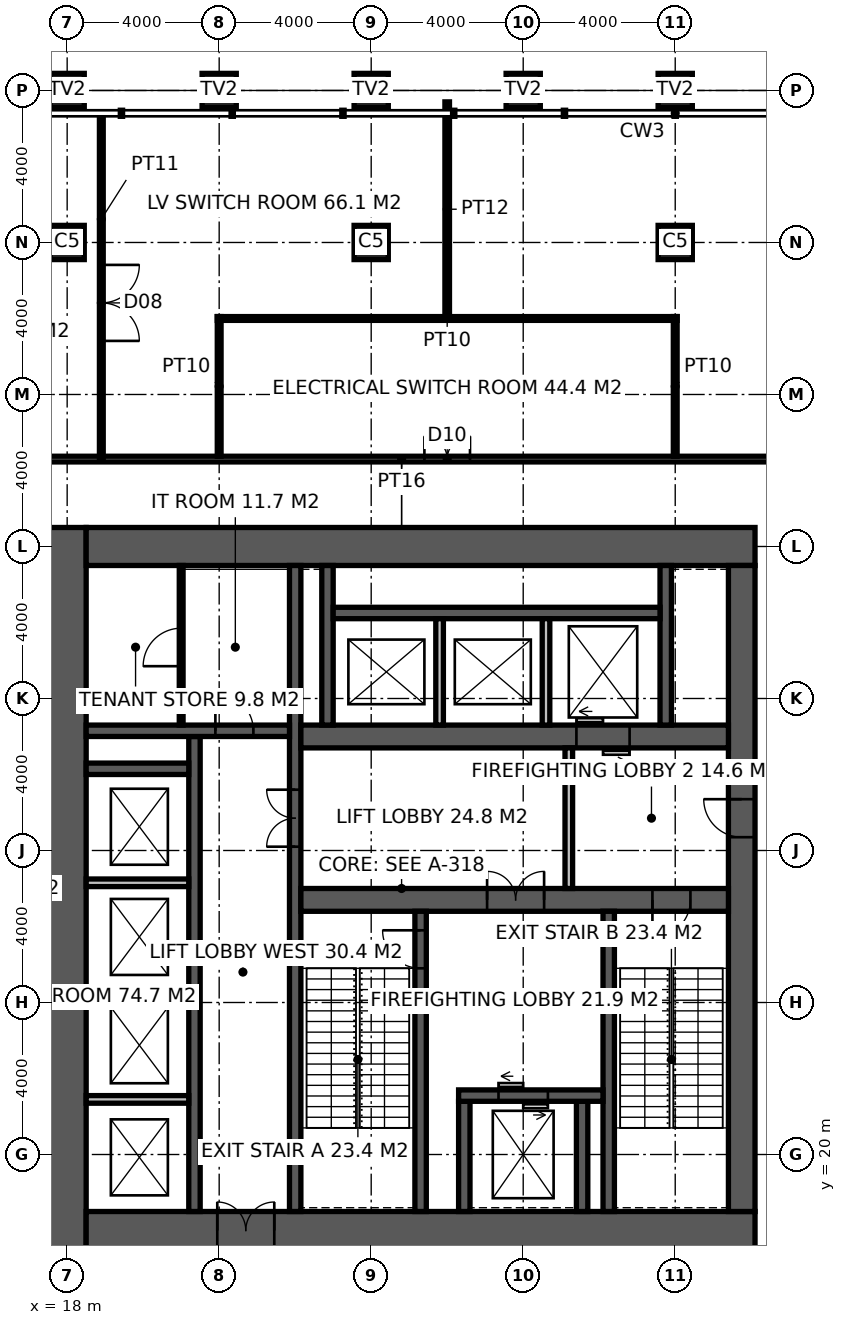
"""IFC4 building model, lengths in metres.
Left out: names, types, materials, properties, quantities, classifications, styles, units other than length and angle.
Written with IfcOpenShell. Run it as: python <this file> out.ifc"""

import sys

from ifc_helpers import new_model, si_unit, direction, frame, frame_2d, origin, origin_2d, place, context, subcontext, project, spatial, rectangle, hollow_rectangle, extrude, element, fill, save


model = new_model("IFC4")
c1 = context("Model", 3, precision=1e-05, world=origin(), true_north=direction((0.0, 1.0)))
c2 = subcontext(c1, "Body", "Model", "MODEL_VIEW")
j1 = project(units=[si_unit("LENGTHUNIT", "METRE"), si_unit("PLANEANGLEUNIT", "RADIAN")], contexts=[c1])
p1 = place(None, origin())
s1 = spatial("IfcSite", under=j1, at=p1, CompositionType="ELEMENT")
p2 = place(p1, origin())
s2 = spatial("IfcBuilding", under=s1, at=p2, CompositionType="ELEMENT")
p3 = place(p2, frame((0.0, 0.0, 71.0)))
s3 = spatial("IfcBuildingStorey", under=s2, at=p3, CompositionType="ELEMENT", Elevation=71.0)
for number, where, z_axis, x_axis in (
    (1, (18.0, 48.0, 0.0), (0.0, 0.0, 1.0), (1.0, 0.0, 0.0)),
    (2, (22.0, 48.0, 0.0), (0.0, 0.0, 1.0), (1.0, 0.0, 0.0)),
    (3, (26.0, 48.0, 0.0), (0.0, 0.0, 1.0), (1.0, 0.0, 0.0)),
    (4, (30.0, 48.0, 0.0), (0.0, 0.0, 1.0), (1.0, 0.0, 0.0)),
    (5, (34.0, 48.0, 0.0), (0.0, 0.0, 1.0), (1.0, 0.0, 0.0)),
):
    element("IfcColumn", number, at=place(p3, frame(where, z_axis=z_axis, x_axis=x_axis)), inside=s3, PredefinedType="USERDEFINED", context=c2, shape_type="SweptSolid", body=[
        extrude(hollow_rectangle(XDim=0.9, YDim=0.9, WallThickness=0.1, at=origin_2d()), origin(), (0.0, 0.0, 1.0), 5.4),
    ])
for number, where, z_axis, x_axis in (
    (6, (18.0, 44.0, 0.0), (0.0, 0.0, 1.0), (1.0, 0.0, 0.0)),
    (7, (26.0, 44.0, 0.0), (0.0, 0.0, 1.0), (1.0, 0.0, 0.0)),
    (8, (34.0, 44.0, 0.0), (0.0, 0.0, 1.0), (1.0, 0.0, 0.0)),
):
    element("IfcColumn", number, at=place(p3, frame(where, z_axis=z_axis, x_axis=x_axis)), inside=s3, PredefinedType="COLUMN", context=c2, shape_type="SweptSolid", body=[
        extrude(hollow_rectangle(XDim=0.9, YDim=0.9, WallThickness=0.1, at=origin_2d()), origin(), (0.0, 0.0, 1.0), 5.4),
    ])
p4 = place(p3, frame((18.0, 17.5, -0.15), z_axis=(0.0, 0.0, 1.0), x_axis=(0.0, 1.0, 0.0)))
e9 = element("IfcWall", 9, at=p4, inside=s3, PredefinedType="SHEAR", context=c2, shape_type="SweptSolid", body=[
    extrude(rectangle(XDim=19.0, YDim=1.0, at=frame_2d((9.5, 0.0))), origin(), (0.0, 0.0, 1.0), 5.4),
])
p5 = place(p3, frame((18.5, 18.0, -0.15), z_axis=(0.0, 0.0, 1.0), x_axis=(1.0, 0.0, 0.0)))
e10 = element("IfcWall", 10, at=p5, inside=s3, PredefinedType="SHEAR", context=c2, shape_type="SweptSolid", body=[
    extrude(rectangle(XDim=17.6, YDim=1.0, at=frame_2d((8.8, 0.0))), origin(), (0.0, 0.0, 1.0), 5.4),
])
p6 = place(p5, frame((3.45, 0.0, 0.15)))
e11 = element("IfcOpeningElement", 11, at=p6, cuts=e10, PredefinedType="OPENING", context=c2, shape_type="SweptSolid", body=[
    extrude(rectangle(XDim=1.5, YDim=2.4, at=frame_2d((0.75, 1.2))), frame((0.0, 0.51, 0.0), z_axis=(0.0, -1.0, 0.0), x_axis=(1.0, 0.0, 0.0)), (0.0, 0.0, 1.0), 1.02),
])
p7 = place(p3, frame((18.5, 36.0, -0.15), z_axis=(0.0, 0.0, 1.0), x_axis=(1.0, 0.0, 0.0)))
e12 = element("IfcWall", 12, at=p7, inside=s3, PredefinedType="SHEAR", context=c2, shape_type="SweptSolid", body=[
    extrude(rectangle(XDim=17.6, YDim=1.0, at=frame_2d((8.8, 0.0))), origin(), (0.0, 0.0, 1.0), 5.4),
])
p8 = place(p3, frame((35.75, 18.5, -0.15), z_axis=(0.0, 0.0, 1.0), x_axis=(0.0, 1.0, 0.0)))
e13 = element("IfcWall", 13, at=p8, inside=s3, PredefinedType="SHEAR", context=c2, shape_type="SweptSolid", body=[
    extrude(rectangle(XDim=17.0, YDim=0.7, at=frame_2d((8.5, 0.0))), origin(), (0.0, 0.0, 1.0), 5.4),
])
p9 = place(p8, frame((9.85, 0.0, 0.15)))
e14 = element("IfcOpeningElement", 14, at=p9, cuts=e13, PredefinedType="OPENING", context=c2, shape_type="SweptSolid", body=[
    extrude(rectangle(XDim=1.0, YDim=2.2, at=frame_2d((0.5, 1.1))), frame((0.0, 0.36, 0.0), z_axis=(0.0, -1.0, 0.0), x_axis=(1.0, 0.0, 0.0)), (0.0, 0.0, 1.0), 0.72),
])
p10 = place(p3, frame((24.0, 18.5, -0.15), z_axis=(0.0, 0.0, 1.0), x_axis=(0.0, 1.0, 0.0)))
e15 = element("IfcWall", 15, at=p10, inside=s3, PredefinedType="SHEAR", context=c2, shape_type="SweptSolid", body=[
    extrude(rectangle(XDim=17.0, YDim=0.3, at=frame_2d((8.5, 0.0))), origin(), (0.0, 0.0, 1.0), 5.4),
])
p11 = place(p10, frame((9.6, 0.0, 0.15)))
e16 = element("IfcOpeningElement", 16, at=p11, cuts=e15, PredefinedType="OPENING", context=c2, shape_type="SweptSolid", body=[
    extrude(rectangle(XDim=1.5, YDim=2.4, at=frame_2d((0.75, 1.2))), frame((0.0, 0.16, 0.0), z_axis=(0.0, -1.0, 0.0), x_axis=(1.0, 0.0, 0.0)), (0.0, 0.0, 1.0), 0.32),
])
p12 = place(p3, frame((24.15, 26.7, -0.15), z_axis=(0.0, 0.0, 1.0), x_axis=(1.0, 0.0, 0.0)))
e17 = element("IfcWall", 17, at=p12, inside=s3, PredefinedType="SHEAR", context=c2, shape_type="SweptSolid", body=[
    extrude(rectangle(XDim=11.25, YDim=0.6, at=frame_2d((5.625, 0.0))), origin(), (0.0, 0.0, 1.0), 5.4),
])
p13 = place(p12, frame((9.25, 0.0, 0.15)))
e18 = element("IfcOpeningElement", 18, at=p13, cuts=e17, PredefinedType="OPENING", context=c2, shape_type="SweptSolid", body=[
    extrude(rectangle(XDim=1.0, YDim=2.2, at=frame_2d((0.5, 1.1))), frame((0.0, 0.31, 0.0), z_axis=(0.0, -1.0, 0.0), x_axis=(1.0, 0.0, 0.0)), (0.0, 0.0, 1.0), 0.62),
])
p14 = place(p12, frame((4.9, 0.0, 0.15)))
e19 = element("IfcOpeningElement", 19, at=p14, cuts=e17, PredefinedType="OPENING", context=c2, shape_type="SweptSolid", body=[
    extrude(rectangle(XDim=1.5, YDim=2.4, at=frame_2d((0.75, 1.2))), frame((0.0, 0.31, 0.0), z_axis=(0.0, -1.0, 0.0), x_axis=(1.0, 0.0, 0.0)), (0.0, 0.0, 1.0), 0.62),
])
p15 = place(p3, frame((27.3, 18.5, -0.15), z_axis=(0.0, 0.0, 1.0), x_axis=(0.0, 1.0, 0.0)))
e20 = element("IfcWall", 20, at=p15, inside=s3, PredefinedType="SHEAR", context=c2, shape_type="SweptSolid", body=[
    extrude(rectangle(XDim=7.9, YDim=0.3, at=frame_2d((3.95, 0.0))), origin(), (0.0, 0.0, 1.0), 5.4),
])
p16 = place(p15, frame((6.4, 0.0, 0.15)))
e21 = element("IfcOpeningElement", 21, at=p16, cuts=e20, PredefinedType="OPENING", context=c2, shape_type="SweptSolid", body=[
    extrude(rectangle(XDim=1.0, YDim=2.2, at=frame_2d((0.5, 1.1))), frame((0.0, 0.16, 0.0), z_axis=(0.0, -1.0, 0.0), x_axis=(1.0, 0.0, 0.0)), (0.0, 0.0, 1.0), 0.32),
])
p17 = place(p3, frame((32.25, 18.5, -0.15), z_axis=(0.0, 0.0, 1.0), x_axis=(0.0, 1.0, 0.0)))
e22 = element("IfcWall", 22, at=p17, inside=s3, PredefinedType="SHEAR", context=c2, shape_type="SweptSolid", body=[
    extrude(rectangle(XDim=7.9, YDim=0.3, at=frame_2d((3.95, 0.0))), origin(), (0.0, 0.0, 1.0), 5.4),
])
for number, where, z_axis, x_axis in (
    (23, (28.45, 18.5, -0.15), (0.0, 0.0, 1.0), (0.0, 1.0, 0.0)),
    (24, (31.55, 18.5, -0.15), (0.0, 0.0, 1.0), (0.0, 1.0, 0.0)),
):
    element("IfcWall", number, at=place(p3, frame(where, z_axis=z_axis, x_axis=x_axis)), inside=s3, PredefinedType="SHEAR", context=c2, shape_type="SweptSolid", body=[
        extrude(rectangle(XDim=2.9, YDim=0.3, at=frame_2d((1.45, 0.0))), origin(), (0.0, 0.0, 1.0), 5.4),
    ])
p18 = place(p3, frame((28.3, 21.55, -0.15), z_axis=(0.0, 0.0, 1.0), x_axis=(1.0, 0.0, 0.0)))
e25 = element("IfcWall", 25, at=p18, inside=s3, PredefinedType="SHEAR", context=c2, shape_type="SweptSolid", body=[
    extrude(rectangle(XDim=3.8, YDim=0.3, at=frame_2d((1.9, 0.0))), origin(), (0.0, 0.0, 1.0), 5.4),
])
p19 = place(p18, frame((1.05, 0.0, 0.15)))
e26 = element("IfcOpeningElement", 26, at=p19, cuts=e25, PredefinedType="OPENING", context=c2, shape_type="SweptSolid", body=[
    extrude(rectangle(XDim=1.3, YDim=2.4, at=frame_2d((0.65, 1.2))), frame((0.0, 0.16, 0.0), z_axis=(0.0, -1.0, 0.0), x_axis=(1.0, 0.0, 0.0)), (0.0, 0.0, 1.0), 0.32),
])
p20 = place(p3, frame((24.15, 31.0, -0.15), z_axis=(0.0, 0.0, 1.0), x_axis=(1.0, 0.0, 0.0)))
e27 = element("IfcWall", 27, at=p20, inside=s3, PredefinedType="SHEAR", context=c2, shape_type="SweptSolid", body=[
    extrude(rectangle(XDim=11.25, YDim=0.6, at=frame_2d((5.625, 0.0))), origin(), (0.0, 0.0, 1.0), 5.4),
])
p21 = place(p20, frame((7.25, 0.0, 0.15)))
e28 = element("IfcOpeningElement", 28, at=p21, cuts=e27, PredefinedType="OPENING", context=c2, shape_type="SweptSolid", body=[
    extrude(rectangle(XDim=1.4, YDim=2.4, at=frame_2d((0.7, 1.2))), frame((0.0, 0.31, 0.0), z_axis=(0.0, -1.0, 0.0), x_axis=(1.0, 0.0, 0.0)), (0.0, 0.0, 1.0), 0.62),
])
p22 = place(p3, frame((21.35, 18.5, -0.15), z_axis=(0.0, 0.0, 1.0), x_axis=(0.0, 1.0, 0.0)))
e29 = element("IfcWall", 29, at=p22, inside=s3, PredefinedType="SHEAR", context=c2, shape_type="SweptSolid", body=[
    extrude(rectangle(XDim=12.5, YDim=0.3, at=frame_2d((6.25, 0.0))), origin(), (0.0, 0.0, 1.0), 5.4),
])
p23 = place(p3, frame((18.5, 31.15, -0.15), z_axis=(0.0, 0.0, 1.0), x_axis=(1.0, 0.0, 0.0)))
e30 = element("IfcWall", 30, at=p23, inside=s3, PredefinedType="SHEAR", context=c2, shape_type="SweptSolid", body=[
    extrude(rectangle(XDim=5.35, YDim=0.3, at=frame_2d((2.675, 0.0))), origin(), (0.0, 0.0, 1.0), 5.4),
])
p24 = place(p23, frame((3.4, 0.0, 0.15)))
e31 = element("IfcOpeningElement", 31, at=p24, cuts=e30, PredefinedType="OPENING", context=c2, shape_type="SweptSolid", body=[
    extrude(rectangle(XDim=1.0, YDim=2.2, at=frame_2d((0.5, 1.1))), frame((0.0, 0.16, 0.0), z_axis=(0.0, -1.0, 0.0), x_axis=(1.0, 0.0, 0.0)), (0.0, 0.0, 1.0), 0.32),
])
p25 = place(p3, frame((18.5, 30.15, -0.15), z_axis=(0.0, 0.0, 1.0), x_axis=(1.0, 0.0, 0.0)))
e32 = element("IfcWall", 32, at=p25, inside=s3, PredefinedType="SHEAR", context=c2, shape_type="SweptSolid", body=[
    extrude(rectangle(XDim=2.7, YDim=0.3, at=frame_2d((1.35, 0.0))), origin(), (0.0, 0.0, 1.0), 5.4),
])
for number, where, z_axis, x_axis in (
    (33, (24.85, 31.3, -0.15), (0.0, 0.0, 1.0), (0.0, 1.0, 0.0)),
    (34, (33.75, 31.3, -0.15), (0.0, 0.0, 1.0), (0.0, 1.0, 0.0)),
):
    element("IfcWall", number, at=place(p3, frame(where, z_axis=z_axis, x_axis=x_axis)), inside=s3, PredefinedType="SHEAR", context=c2, shape_type="SweptSolid", body=[
        extrude(rectangle(XDim=4.2, YDim=0.3, at=frame_2d((2.1, 0.0))), origin(), (0.0, 0.0, 1.0), 5.4),
    ])
p26 = place(p3, frame((25.0, 34.25, -0.15), z_axis=(0.0, 0.0, 1.0), x_axis=(1.0, 0.0, 0.0)))
e35 = element("IfcWall", 35, at=p26, inside=s3, PredefinedType="SHEAR", context=c2, shape_type="SweptSolid", body=[
    extrude(rectangle(XDim=8.6, YDim=0.3, at=frame_2d((4.3, 0.0))), origin(), (0.0, 0.0, 1.0), 5.4),
])
for number, where, z_axis, x_axis in (
    (36, (27.8, 31.3, -0.15), (0.0, 0.0, 1.0), (0.0, 1.0, 0.0)),
    (37, (30.6, 31.3, -0.15), (0.0, 0.0, 1.0), (0.0, 1.0, 0.0)),
):
    element("IfcWall", number, at=place(p3, frame(where, z_axis=z_axis, x_axis=x_axis)), inside=s3, PredefinedType="SOLIDWALL", context=c2, shape_type="SweptSolid", body=[
        extrude(rectangle(XDim=2.8, YDim=0.2, at=frame_2d((1.4, 0.0))), origin(), (0.0, 0.0, 1.0), 5.4),
    ])
for number, where, z_axis, x_axis in (
    (38, (18.5, 21.45, 0.0), (0.0, 0.0, 1.0), (1.0, 0.0, 0.0)),
    (39, (18.5, 24.3, 0.0), (0.0, 0.0, 1.0), (1.0, 0.0, 0.0)),
    (40, (18.5, 27.15, 0.0), (0.0, 0.0, 1.0), (1.0, 0.0, 0.0)),
):
    element("IfcWall", number, at=place(p3, frame(where, z_axis=z_axis, x_axis=x_axis)), inside=s3, PredefinedType="SOLIDWALL", context=c2, shape_type="SweptSolid", body=[
        extrude(rectangle(XDim=2.7, YDim=0.2, at=frame_2d((1.35, 0.0))), origin(), (0.0, 0.0, 1.0), 5.25),
    ])
p27 = place(p3, frame((31.2, 27.0, 0.0), z_axis=(0.0, 0.0, 1.0), x_axis=(0.0, 1.0, 0.0)))
e41 = element("IfcWall", 41, at=p27, inside=s3, PredefinedType="SOLIDWALL", context=c2, shape_type="SweptSolid", body=[
    extrude(rectangle(XDim=3.7, YDim=0.2, at=frame_2d((1.85, 0.0))), origin(), (0.0, 0.0, 1.0), 5.25),
])
p28 = place(p3, frame((21.0, 31.3, 0.0), z_axis=(0.0, 0.0, 1.0), x_axis=(0.0, 1.0, 0.0)))
e42 = element("IfcWall", 42, at=p28, inside=s3, PredefinedType="PARTITIONING", context=c2, shape_type="SweptSolid", body=[
    extrude(rectangle(XDim=4.2, YDim=0.1, at=frame_2d((2.1, 0.0))), origin(), (0.0, 0.0, 1.0), 5.25),
])
p29 = place(p28, frame((1.55, 0.0, 0.0)))
e43 = element("IfcOpeningElement", 43, at=p29, cuts=e42, PredefinedType="OPENING", context=c2, shape_type="SweptSolid", body=[
    extrude(rectangle(XDim=1.0, YDim=2.2, at=frame_2d((0.5, 1.1))), frame((0.0, 0.06, 0.0), z_axis=(0.0, -1.0, 0.0), x_axis=(1.0, 0.0, 0.0)), (0.0, 0.0, 1.0), 0.12),
])
p30 = place(p3, frame((15.775, 38.3, 0.0), z_axis=(0.0, 0.0, 1.0), x_axis=(1.0, 0.0, 0.0)))
e44 = element("IfcWall", 44, at=p30, inside=s3, PredefinedType="PARTITIONING", context=c2, shape_type="SweptSolid", body=[
    extrude(rectangle(XDim=22.05, YDim=0.15, at=frame_2d((11.025, 0.0))), origin(), (0.0, 0.0, 1.0), 5.25),
])
p31 = place(p30, frame((11.625, 0.0, 0.0)))
e45 = element("IfcOpeningElement", 45, at=p31, cuts=e44, PredefinedType="OPENING", context=c2, shape_type="SweptSolid", body=[
    extrude(rectangle(XDim=1.2, YDim=2.2, at=frame_2d((0.6, 1.1))), frame((0.0, 0.085, 0.0), z_axis=(0.0, -1.0, 0.0), x_axis=(1.0, 0.0, 0.0)), (0.0, 0.0, 1.0), 0.17),
])
p32 = place(p3, frame((22.0, 38.375, 0.0), z_axis=(0.0, 0.0, 1.0), x_axis=(0.0, 1.0, 0.0)))
e46 = element("IfcWall", 46, at=p32, inside=s3, PredefinedType="PARTITIONING", context=c2, shape_type="SweptSolid", body=[
    extrude(rectangle(XDim=3.675, YDim=0.1, at=frame_2d((1.837, 0.0))), origin(), (0.0, 0.0, 1.0), 4.35),
])
p33 = place(p3, frame((34.0, 38.375, 0.0), z_axis=(0.0, 0.0, 1.0), x_axis=(0.0, 1.0, 0.0)))
e47 = element("IfcWall", 47, at=p33, inside=s3, PredefinedType="PARTITIONING", context=c2, shape_type="SweptSolid", body=[
    extrude(rectangle(XDim=3.675, YDim=0.1, at=frame_2d((1.837, 0.0))), origin(), (0.0, 0.0, 1.0), 4.25),
])
p34 = place(p3, frame((21.95, 42.0, 0.0), z_axis=(0.0, 0.0, 1.0), x_axis=(1.0, 0.0, 0.0)))
e48 = element("IfcWall", 48, at=p34, inside=s3, PredefinedType="PARTITIONING", context=c2, shape_type="SweptSolid", body=[
    extrude(rectangle(XDim=12.1, YDim=0.1, at=frame_2d((6.05, 0.0))), origin(), (0.0, 0.0, 1.0), 5.25),
])
p35 = place(p3, frame((28.0, 42.05, 0.0), z_axis=(0.0, 0.0, 1.0), x_axis=(0.0, 1.0, 0.0)))
e49 = element("IfcWall", 49, at=p35, inside=s3, PredefinedType="PARTITIONING", context=c2, shape_type="SweptSolid", body=[
    extrude(rectangle(XDim=5.65, YDim=0.12, at=frame_2d((2.825, 0.0))), origin(), (0.0, 0.0, 1.0), 5.25),
])
p36 = place(p3, frame((18.899, 47.32, 0.0), z_axis=(0.0, 0.0, 1.0), x_axis=(0.0, -1.0, 0.0)))
e50 = element("IfcWall", 50, at=p36, inside=s3, PredefinedType="PARTITIONING", context=c2, shape_type="SweptSolid", body=[
    extrude(rectangle(XDim=9.02, YDim=0.1, at=frame_2d((4.51, 0.0))), origin(), (0.0, 0.0, 1.0), 5.25),
])
p37 = place(p36, frame((3.91, 0.0, 0.0)))
e51 = element("IfcOpeningElement", 51, at=p37, cuts=e50, PredefinedType="OPENING", context=c2, shape_type="SweptSolid", body=[
    extrude(rectangle(XDim=2.0, YDim=2.4, at=frame_2d((1.0, 1.2))), frame((0.0, 0.06, 0.0), z_axis=(0.0, -1.0, 0.0), x_axis=(1.0, 0.0, 0.0)), (0.0, 0.0, 1.0), 0.12),
])
p38 = place(p16, origin())
e52 = element("IfcDoor", 52, at=p38, inside=s3, OperationType="SINGLE_SWING_RIGHT", PredefinedType="DOOR", context=c2, shape_type="SweptSolid", body=[
    extrude(rectangle(XDim=1.0, YDim=2.2, at=frame_2d((0.5, 1.1))), frame((0.0, 0.025, 0.0), z_axis=(0.0, -1.0, 0.0), x_axis=(1.0, 0.0, 0.0)), (0.0, 0.0, 1.0), 0.05),
])
fill(e21, e52)
p39 = place(p13, frame((1.0, 0.0, 0.0), z_axis=(0.0, 0.0, 1.0), x_axis=(-1.0, 0.0, 0.0)))
e53 = element("IfcDoor", 53, at=p39, inside=s3, OperationType="SINGLE_SWING_RIGHT", PredefinedType="DOOR", context=c2, shape_type="SweptSolid", body=[
    extrude(rectangle(XDim=1.0, YDim=2.2, at=frame_2d((0.5, 1.1))), frame((0.0, 0.025, 0.0), z_axis=(0.0, -1.0, 0.0), x_axis=(1.0, 0.0, 0.0)), (0.0, 0.0, 1.0), 0.05),
])
fill(e18, e53)
p40 = place(p9, origin())
e54 = element("IfcDoor", 54, at=p40, inside=s3, OperationType="SINGLE_SWING_RIGHT", PredefinedType="DOOR", context=c2, shape_type="SweptSolid", body=[
    extrude(rectangle(XDim=1.0, YDim=2.2, at=frame_2d((0.5, 1.1))), frame((0.0, 0.025, 0.0), z_axis=(0.0, -1.0, 0.0), x_axis=(1.0, 0.0, 0.0)), (0.0, 0.0, 1.0), 0.05),
])
fill(e14, e54)
p41 = place(p14, origin())
e55 = element("IfcDoor", 55, at=p41, inside=s3, OperationType="DOUBLE_DOOR_DOUBLE_SWING", PredefinedType="DOOR", context=c2, shape_type="SweptSolid", body=[
    extrude(rectangle(XDim=1.5, YDim=2.4, at=frame_2d((0.75, 1.2))), frame((0.0, 0.025, 0.0), z_axis=(0.0, -1.0, 0.0), x_axis=(1.0, 0.0, 0.0)), (0.0, 0.0, 1.0), 0.05),
])
fill(e19, e55)
p42 = place(p11, origin())
e56 = element("IfcDoor", 56, at=p42, inside=s3, OperationType="DOUBLE_DOOR_DOUBLE_SWING", PredefinedType="DOOR", context=c2, shape_type="SweptSolid", body=[
    extrude(rectangle(XDim=1.5, YDim=2.4, at=frame_2d((0.75, 1.2))), frame((0.0, 0.025, 0.0), z_axis=(0.0, -1.0, 0.0), x_axis=(1.0, 0.0, 0.0)), (0.0, 0.0, 1.0), 0.05),
])
fill(e16, e56)
p43 = place(p24, origin())
e57 = element("IfcDoor", 57, at=p43, inside=s3, OperationType="SINGLE_SWING_LEFT", PredefinedType="DOOR", context=c2, shape_type="SweptSolid", body=[
    extrude(rectangle(XDim=1.0, YDim=2.2, at=frame_2d((0.5, 1.1))), frame((0.0, 0.025, 0.0), z_axis=(0.0, -1.0, 0.0), x_axis=(1.0, 0.0, 0.0)), (0.0, 0.0, 1.0), 0.05),
])
fill(e31, e57)
p44 = place(p29, origin())
e58 = element("IfcDoor", 58, at=p44, inside=s3, OperationType="SINGLE_SWING_LEFT", PredefinedType="DOOR", context=c2, shape_type="SweptSolid", body=[
    extrude(rectangle(XDim=1.0, YDim=2.2, at=frame_2d((0.5, 1.1))), frame((0.0, 0.025, 0.0), z_axis=(0.0, -1.0, 0.0), x_axis=(1.0, 0.0, 0.0)), (0.0, 0.0, 1.0), 0.05),
])
fill(e43, e58)
p45 = place(p6, origin())
e59 = element("IfcDoor", 59, at=p45, inside=s3, OperationType="DOUBLE_DOOR_DOUBLE_SWING", PredefinedType="DOOR", context=c2, shape_type="SweptSolid", body=[
    extrude(rectangle(XDim=1.5, YDim=2.4, at=frame_2d((0.75, 1.2))), frame((0.0, 0.025, 0.0), z_axis=(0.0, -1.0, 0.0), x_axis=(1.0, 0.0, 0.0)), (0.0, 0.0, 1.0), 0.05),
])
fill(e11, e59)
p46 = place(p31, origin())
e60 = element("IfcDoor", 60, at=p46, inside=s3, OperationType="DOUBLE_DOOR_DOUBLE_SWING", PredefinedType="DOOR", context=c2, shape_type="SweptSolid", body=[
    extrude(rectangle(XDim=1.2, YDim=2.2, at=frame_2d((0.6, 1.1))), frame((0.0, 0.025, 0.0), z_axis=(0.0, -1.0, 0.0), x_axis=(1.0, 0.0, 0.0)), (0.0, 0.0, 1.0), 0.05),
])
fill(e45, e60)
p47 = place(p37, origin())
e61 = element("IfcDoor", 61, at=p47, inside=s3, OperationType="DOUBLE_DOOR_DOUBLE_SWING", PredefinedType="DOOR", context=c2, shape_type="SweptSolid", body=[
    extrude(rectangle(XDim=2.0, YDim=2.4, at=frame_2d((1.0, 1.2))), frame((0.0, 0.025, 0.0), z_axis=(0.0, -1.0, 0.0), x_axis=(1.0, 0.0, 0.0)), (0.0, 0.0, 1.0), 0.05),
])
fill(e51, e61)
p48 = place(p19, origin())
e62 = element("IfcDoor", 62, at=p48, inside=s3, OperationType="DOUBLE_DOOR_SLIDING", PredefinedType="DOOR", context=c2, shape_type="SweptSolid", body=[
    extrude(rectangle(XDim=1.3, YDim=2.4, at=frame_2d((0.65, 1.2))), frame((0.0, 0.025, 0.0), z_axis=(0.0, -1.0, 0.0), x_axis=(1.0, 0.0, 0.0)), (0.0, 0.0, 1.0), 0.05),
])
fill(e26, e62)
p49 = place(p21, origin())
e63 = element("IfcDoor", 63, at=p49, inside=s3, OperationType="DOUBLE_DOOR_SLIDING", PredefinedType="DOOR", context=c2, shape_type="SweptSolid", body=[
    extrude(rectangle(XDim=1.4, YDim=2.4, at=frame_2d((0.7, 1.2))), frame((0.0, 0.025, 0.0), z_axis=(0.0, -1.0, 0.0), x_axis=(1.0, 0.0, 0.0)), (0.0, 0.0, 1.0), 0.05),
])
fill(e28, e63)
save(model, sys.argv[1])
